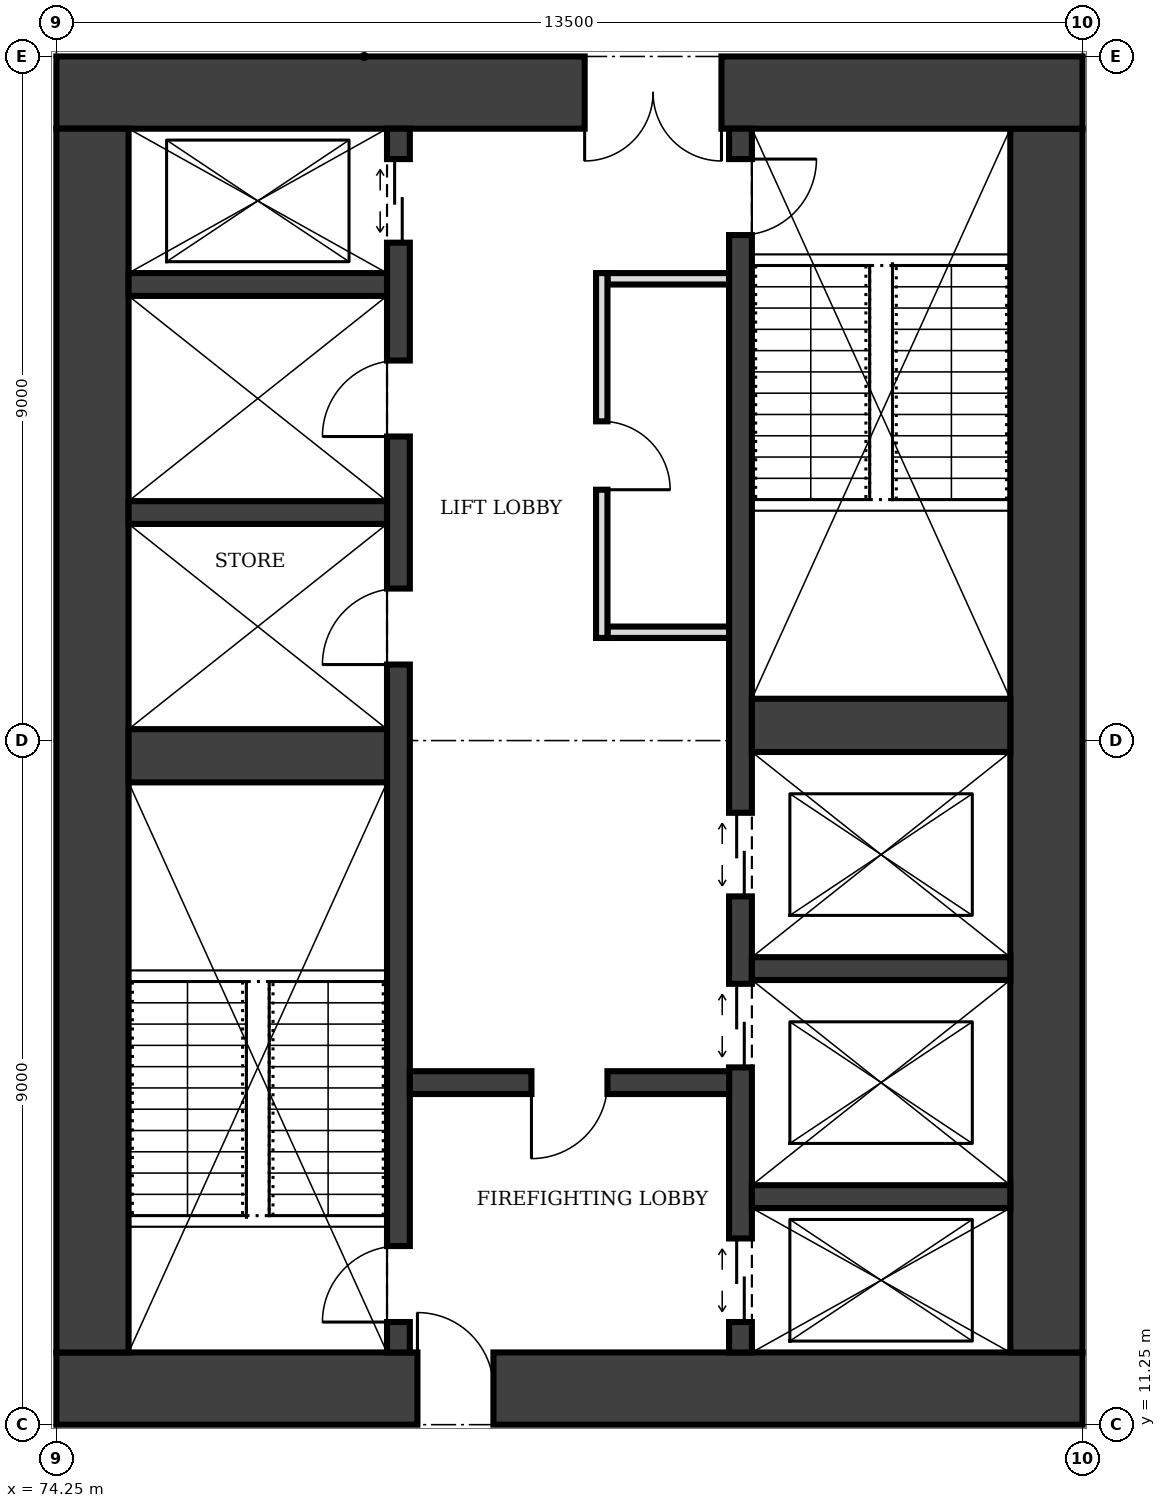
"""IFC4 building model, lengths in metres.
Left out: names, types, materials, properties, quantities, classifications, styles, units other than length and angle.
Written with IfcOpenShell. Run it as: python <this file> out.ifc"""

import sys

from ifc_helpers import new_model, si_unit, direction, frame, frame_2d, origin, place, context, subcontext, project, spatial, rectangle, extrude, element, fill, save


model = new_model("IFC4")
c1 = context("Model", 3, precision=1e-05, world=origin(), true_north=direction((0.0, 1.0)))
c2 = subcontext(c1, "Body", "Model", "MODEL_VIEW")
j1 = project(units=[si_unit("LENGTHUNIT", "METRE"), si_unit("PLANEANGLEUNIT", "RADIAN")], contexts=[c1])
p1 = place(None, origin())
s1 = spatial("IfcSite", under=j1, at=p1, CompositionType="ELEMENT")
p2 = place(p1, origin())
s2 = spatial("IfcBuilding", under=s1, at=p2, CompositionType="ELEMENT")
p3 = place(p2, frame((0.0, 0.0, 189.0)))
s3 = spatial("IfcBuildingStorey", under=s2, at=p3, CompositionType="ELEMENT", Elevation=189.0)
p4 = place(p3, frame((74.25, 11.725, 0.0), z_axis=(0.0, 0.0, 1.0), x_axis=(1.0, 0.0, 0.0)))
e1 = element("IfcWall", 1, at=p4, inside=s3, PredefinedType="SHEAR", context=c2, shape_type="SweptSolid", body=[
    extrude(rectangle(XDim=13.5, YDim=0.95, at=frame_2d((6.75, 0.0))), origin(), (0.0, 0.0, 1.0), 4.0),
])
p5 = place(p4, frame((4.75, 0.0, 0.0)))
e2 = element("IfcOpeningElement", 2, at=p5, cuts=e1, PredefinedType="OPENING", context=c2, shape_type="SweptSolid", body=[
    extrude(rectangle(XDim=1.0, YDim=2.1, at=frame_2d((0.5, 1.05))), frame((0.0, 0.485, 0.0), z_axis=(0.0, -1.0, 0.0), x_axis=(1.0, 0.0, 0.0)), (0.0, 0.0, 1.0), 0.97),
])
p6 = place(p3, frame((87.275, 12.2, 0.0), z_axis=(0.0, 0.0, 1.0), x_axis=(0.0, 1.0, 0.0)))
e3 = element("IfcWall", 3, at=p6, inside=s3, PredefinedType="SHEAR", context=c2, shape_type="SweptSolid", body=[
    extrude(rectangle(XDim=16.1, YDim=0.95, at=frame_2d((8.05, 0.0))), origin(), (0.0, 0.0, 1.0), 4.0),
])
p7 = place(p3, frame((87.75, 28.775, 0.0), z_axis=(0.0, 0.0, 1.0), x_axis=(-1.0, 0.0, 0.0)))
e4 = element("IfcWall", 4, at=p7, inside=s3, PredefinedType="SHEAR", context=c2, shape_type="SweptSolid", body=[
    extrude(rectangle(XDim=13.5, YDim=0.95, at=frame_2d((6.75, 0.0))), origin(), (0.0, 0.0, 1.0), 4.0),
])
p8 = place(p7, frame((4.75, 0.0, 0.0)))
e5 = element("IfcOpeningElement", 5, at=p8, cuts=e4, PredefinedType="OPENING", context=c2, shape_type="SweptSolid", body=[
    extrude(rectangle(XDim=1.8, YDim=2.1, at=frame_2d((0.9, 1.05))), frame((0.0, 0.485, 0.0), z_axis=(0.0, -1.0, 0.0), x_axis=(1.0, 0.0, 0.0)), (0.0, 0.0, 1.0), 0.97),
])
p9 = place(p3, frame((74.725, 28.3, 0.0), z_axis=(0.0, 0.0, 1.0), x_axis=(0.0, -1.0, 0.0)))
e6 = element("IfcWall", 6, at=p9, inside=s3, PredefinedType="SHEAR", context=c2, shape_type="SweptSolid", body=[
    extrude(rectangle(XDim=16.1, YDim=0.95, at=frame_2d((8.05, 0.0))), origin(), (0.0, 0.0, 1.0), 4.0),
])
p10 = place(p3, frame((78.75, 12.2, 0.0), z_axis=(0.0, 0.0, 1.0), x_axis=(0.0, 1.0, 0.0)))
e7 = element("IfcWall", 7, at=p10, inside=s3, PredefinedType="SHEAR", context=c2, shape_type="SweptSolid", body=[
    extrude(rectangle(XDim=16.1, YDim=0.3, at=frame_2d((8.05, 0.0))), origin(), (0.0, 0.0, 1.0), 4.0),
])
p11 = place(p10, frame((0.4, 0.0, 0.0)))
e8 = element("IfcOpeningElement", 8, at=p11, cuts=e7, PredefinedType="OPENING", context=c2, shape_type="SweptSolid", body=[
    extrude(rectangle(XDim=1.0, YDim=2.1, at=frame_2d((0.5, 1.05))), frame((0.0, 0.16, 0.0), z_axis=(0.0, -1.0, 0.0), x_axis=(1.0, 0.0, 0.0)), (0.0, 0.0, 1.0), 0.32),
])
p12 = place(p10, frame((14.6, 0.0, 0.0)))
e9 = element("IfcOpeningElement", 9, at=p12, cuts=e7, PredefinedType="OPENING", context=c2, shape_type="SweptSolid", body=[
    extrude(rectangle(XDim=1.1, YDim=2.1, at=frame_2d((0.55, 1.05))), frame((0.0, 0.16, 0.0), z_axis=(0.0, -1.0, 0.0), x_axis=(1.0, 0.0, 0.0)), (0.0, 0.0, 1.0), 0.32),
])
p13 = place(p10, frame((9.05, 0.0, 0.0)))
e10 = element("IfcOpeningElement", 10, at=p13, cuts=e7, PredefinedType="OPENING", context=c2, shape_type="SweptSolid", body=[
    extrude(rectangle(XDim=1.0, YDim=2.1, at=frame_2d((0.5, 1.05))), frame((0.0, 0.16, 0.0), z_axis=(0.0, -1.0, 0.0), x_axis=(1.0, 0.0, 0.0)), (0.0, 0.0, 1.0), 0.32),
])
p14 = place(p10, frame((12.05, 0.0, 0.0)))
e11 = element("IfcOpeningElement", 11, at=p14, cuts=e7, PredefinedType="OPENING", context=c2, shape_type="SweptSolid", body=[
    extrude(rectangle(XDim=1.0, YDim=2.1, at=frame_2d((0.5, 1.05))), frame((0.0, 0.16, 0.0), z_axis=(0.0, -1.0, 0.0), x_axis=(1.0, 0.0, 0.0)), (0.0, 0.0, 1.0), 0.32),
])
p15 = place(p3, frame((83.25, 12.2, 0.0), z_axis=(0.0, 0.0, 1.0), x_axis=(0.0, 1.0, 0.0)))
e12 = element("IfcWall", 12, at=p15, inside=s3, PredefinedType="SHEAR", context=c2, shape_type="SweptSolid", body=[
    extrude(rectangle(XDim=16.1, YDim=0.3, at=frame_2d((8.05, 0.0))), origin(), (0.0, 0.0, 1.0), 4.0),
])
p16 = place(p15, frame((14.7, 0.0, 0.0)))
e13 = element("IfcOpeningElement", 13, at=p16, cuts=e12, PredefinedType="OPENING", context=c2, shape_type="SweptSolid", body=[
    extrude(rectangle(XDim=1.0, YDim=2.1, at=frame_2d((0.5, 1.05))), frame((0.0, 0.16, 0.0), z_axis=(0.0, -1.0, 0.0), x_axis=(1.0, 0.0, 0.0)), (0.0, 0.0, 1.0), 0.32),
])
p17 = place(p15, frame((0.4, 0.0, 0.0)))
e14 = element("IfcOpeningElement", 14, at=p17, cuts=e12, PredefinedType="OPENING", context=c2, shape_type="SweptSolid", body=[
    extrude(rectangle(XDim=1.1, YDim=2.1, at=frame_2d((0.55, 1.05))), frame((0.0, 0.16, 0.0), z_axis=(0.0, -1.0, 0.0), x_axis=(1.0, 0.0, 0.0)), (0.0, 0.0, 1.0), 0.32),
])
p18 = place(p15, frame((3.75, 0.0, 0.0)))
e15 = element("IfcOpeningElement", 15, at=p18, cuts=e12, PredefinedType="OPENING", context=c2, shape_type="SweptSolid", body=[
    extrude(rectangle(XDim=1.1, YDim=2.1, at=frame_2d((0.55, 1.05))), frame((0.0, 0.16, 0.0), z_axis=(0.0, -1.0, 0.0), x_axis=(1.0, 0.0, 0.0)), (0.0, 0.0, 1.0), 0.32),
])
p19 = place(p15, frame((6.0, 0.0, 0.0)))
e16 = element("IfcOpeningElement", 16, at=p19, cuts=e12, PredefinedType="OPENING", context=c2, shape_type="SweptSolid", body=[
    extrude(rectangle(XDim=1.1, YDim=2.1, at=frame_2d((0.55, 1.05))), frame((0.0, 0.16, 0.0), z_axis=(0.0, -1.0, 0.0), x_axis=(1.0, 0.0, 0.0)), (0.0, 0.0, 1.0), 0.32),
])
p20 = place(p3, frame((75.2, 20.05, 0.0), z_axis=(0.0, 0.0, 1.0), x_axis=(1.0, 0.0, 0.0)))
e17 = element("IfcWall", 17, at=p20, inside=s3, PredefinedType="SHEAR", context=c2, shape_type="SweptSolid", body=[
    extrude(rectangle(XDim=3.4, YDim=0.7, at=frame_2d((1.7, 0.0))), origin(), (0.0, 0.0, 1.0), 4.0),
])
p21 = place(p3, frame((78.9, 15.75, 0.0), z_axis=(0.0, 0.0, 1.0), x_axis=(1.0, 0.0, 0.0)))
e18 = element("IfcWall", 18, at=p21, inside=s3, PredefinedType="SHEAR", context=c2, shape_type="SweptSolid", body=[
    extrude(rectangle(XDim=4.2, YDim=0.3, at=frame_2d((2.1, 0.0))), origin(), (0.0, 0.0, 1.0), 4.0),
])
p22 = place(p21, frame((1.6, 0.0, 0.0)))
e19 = element("IfcOpeningElement", 19, at=p22, cuts=e18, PredefinedType="OPENING", context=c2, shape_type="SweptSolid", body=[
    extrude(rectangle(XDim=1.0, YDim=2.1, at=frame_2d((0.5, 1.05))), frame((0.0, 0.16, 0.0), z_axis=(0.0, -1.0, 0.0), x_axis=(1.0, 0.0, 0.0)), (0.0, 0.0, 1.0), 0.32),
])
for number, where, z_axis, x_axis in (
    (20, (83.4, 14.25, 0.0), (0.0, 0.0, 1.0), (1.0, 0.0, 0.0)),
    (21, (83.4, 17.25, 0.0), (0.0, 0.0, 1.0), (1.0, 0.0, 0.0)),
):
    element("IfcWall", number, at=place(p3, frame(where, z_axis=z_axis, x_axis=x_axis)), inside=s3, PredefinedType="SHEAR", context=c2, shape_type="SweptSolid", body=[
        extrude(rectangle(XDim=3.4, YDim=0.3, at=frame_2d((1.7, 0.0))), origin(), (0.0, 0.0, 1.0), 4.0),
    ])
p23 = place(p3, frame((83.4, 20.45, 0.0), z_axis=(0.0, 0.0, 1.0), x_axis=(1.0, 0.0, 0.0)))
e22 = element("IfcWall", 22, at=p23, inside=s3, PredefinedType="SHEAR", context=c2, shape_type="SweptSolid", body=[
    extrude(rectangle(XDim=3.4, YDim=0.7, at=frame_2d((1.7, 0.0))), origin(), (0.0, 0.0, 1.0), 4.0),
])
for number, where, z_axis, x_axis in (
    (23, (75.2, 23.25, 0.0), (0.0, 0.0, 1.0), (1.0, 0.0, 0.0)),
    (24, (75.2, 26.25, 0.0), (0.0, 0.0, 1.0), (1.0, 0.0, 0.0)),
):
    element("IfcWall", number, at=place(p3, frame(where, z_axis=z_axis, x_axis=x_axis)), inside=s3, PredefinedType="SHEAR", context=c2, shape_type="SweptSolid", body=[
        extrude(rectangle(XDim=3.4, YDim=0.3, at=frame_2d((1.7, 0.0))), origin(), (0.0, 0.0, 1.0), 4.0),
    ])
p24 = place(p3, frame((81.425, 21.6, 0.0), z_axis=(0.0, 0.0, 1.0), x_axis=(0.0, 1.0, 0.0)))
e25 = element("IfcWall", 25, at=p24, inside=s3, PredefinedType="PARTITIONING", context=c2, shape_type="SweptSolid", body=[
    extrude(rectangle(XDim=4.8, YDim=0.15, at=frame_2d((2.4, 0.0))), origin(), (0.0, 0.0, 1.0), 3.75),
])
p25 = place(p24, frame((1.95, 0.0, 0.0)))
e26 = element("IfcOpeningElement", 26, at=p25, cuts=e25, PredefinedType="OPENING", context=c2, shape_type="SweptSolid", body=[
    extrude(rectangle(XDim=0.9, YDim=2.1, at=frame_2d((0.45, 1.05))), frame((0.0, 0.085, 0.0), z_axis=(0.0, -1.0, 0.0), x_axis=(1.0, 0.0, 0.0)), (0.0, 0.0, 1.0), 0.17),
])
for number, where, z_axis, x_axis in (
    (27, (81.5, 21.675, 0.0), (0.0, 0.0, 1.0), (1.0, 0.0, 0.0)),
    (28, (81.5, 26.325, 0.0), (0.0, 0.0, 1.0), (1.0, 0.0, 0.0)),
):
    element("IfcWall", number, at=place(p3, frame(where, z_axis=z_axis, x_axis=x_axis)), inside=s3, PredefinedType="PARTITIONING", context=c2, shape_type="SweptSolid", body=[
        extrude(rectangle(XDim=1.6, YDim=0.15, at=frame_2d((0.8, 0.0))), origin(), (0.0, 0.0, 1.0), 3.75),
    ])
p26 = place(p5, origin())
e29 = element("IfcDoor", 29, at=p26, inside=s3, OperationType="SINGLE_SWING_LEFT", PredefinedType="DOOR", context=c2, shape_type="SweptSolid", body=[
    extrude(rectangle(XDim=1.0, YDim=2.1, at=frame_2d((0.5, 1.05))), frame((0.0, 0.025, 0.0), z_axis=(0.0, -1.0, 0.0), x_axis=(1.0, 0.0, 0.0)), (0.0, 0.0, 1.0), 0.05),
])
fill(e2, e29)
p27 = place(p8, origin())
e30 = element("IfcDoor", 30, at=p27, inside=s3, OperationType="DOUBLE_DOOR_SINGLE_SWING", PredefinedType="DOOR", context=c2, shape_type="SweptSolid", body=[
    extrude(rectangle(XDim=1.8, YDim=2.1, at=frame_2d((0.9, 1.05))), frame((0.0, 0.025, 0.0), z_axis=(0.0, -1.0, 0.0), x_axis=(1.0, 0.0, 0.0)), (0.0, 0.0, 1.0), 0.05),
])
fill(e5, e30)
p28 = place(p22, frame((1.0, 0.0, 0.0), z_axis=(0.0, 0.0, 1.0), x_axis=(-1.0, 0.0, 0.0)))
e31 = element("IfcDoor", 31, at=p28, inside=s3, OperationType="SINGLE_SWING_RIGHT", PredefinedType="DOOR", context=c2, shape_type="SweptSolid", body=[
    extrude(rectangle(XDim=1.0, YDim=2.1, at=frame_2d((0.5, 1.05))), frame((0.0, 0.025, 0.0), z_axis=(0.0, -1.0, 0.0), x_axis=(1.0, 0.0, 0.0)), (0.0, 0.0, 1.0), 0.05),
])
fill(e19, e31)
p29 = place(p11, origin())
e32 = element("IfcDoor", 32, at=p29, inside=s3, OperationType="SINGLE_SWING_LEFT", PredefinedType="DOOR", context=c2, shape_type="SweptSolid", body=[
    extrude(rectangle(XDim=1.0, YDim=2.1, at=frame_2d((0.5, 1.05))), frame((0.0, 0.025, 0.0), z_axis=(0.0, -1.0, 0.0), x_axis=(1.0, 0.0, 0.0)), (0.0, 0.0, 1.0), 0.05),
])
fill(e8, e32)
p30 = place(p16, frame((1.0, 0.0, 0.0), z_axis=(0.0, 0.0, 1.0), x_axis=(-1.0, 0.0, 0.0)))
e33 = element("IfcDoor", 33, at=p30, inside=s3, OperationType="SINGLE_SWING_LEFT", PredefinedType="DOOR", context=c2, shape_type="SweptSolid", body=[
    extrude(rectangle(XDim=1.0, YDim=2.1, at=frame_2d((0.5, 1.05))), frame((0.0, 0.025, 0.0), z_axis=(0.0, -1.0, 0.0), x_axis=(1.0, 0.0, 0.0)), (0.0, 0.0, 1.0), 0.05),
])
fill(e13, e33)
p31 = place(p17, origin())
e34 = element("IfcDoor", 34, at=p31, inside=s3, OperationType="DOUBLE_DOOR_SLIDING", PredefinedType="DOOR", context=c2, shape_type="SweptSolid", body=[
    extrude(rectangle(XDim=1.1, YDim=2.1, at=frame_2d((0.55, 1.05))), frame((0.0, 0.025, 0.0), z_axis=(0.0, -1.0, 0.0), x_axis=(1.0, 0.0, 0.0)), (0.0, 0.0, 1.0), 0.05),
])
fill(e14, e34)
p32 = place(p12, origin())
e35 = element("IfcDoor", 35, at=p32, inside=s3, OperationType="DOUBLE_DOOR_SLIDING", PredefinedType="DOOR", context=c2, shape_type="SweptSolid", body=[
    extrude(rectangle(XDim=1.1, YDim=2.1, at=frame_2d((0.55, 1.05))), frame((0.0, 0.025, 0.0), z_axis=(0.0, -1.0, 0.0), x_axis=(1.0, 0.0, 0.0)), (0.0, 0.0, 1.0), 0.05),
])
fill(e9, e35)
p33 = place(p18, origin())
e36 = element("IfcDoor", 36, at=p33, inside=s3, OperationType="DOUBLE_DOOR_SLIDING", PredefinedType="DOOR", context=c2, shape_type="SweptSolid", body=[
    extrude(rectangle(XDim=1.1, YDim=2.1, at=frame_2d((0.55, 1.05))), frame((0.0, 0.025, 0.0), z_axis=(0.0, -1.0, 0.0), x_axis=(1.0, 0.0, 0.0)), (0.0, 0.0, 1.0), 0.05),
])
fill(e15, e36)
p34 = place(p19, origin())
e37 = element("IfcDoor", 37, at=p34, inside=s3, OperationType="DOUBLE_DOOR_SLIDING", PredefinedType="DOOR", context=c2, shape_type="SweptSolid", body=[
    extrude(rectangle(XDim=1.1, YDim=2.1, at=frame_2d((0.55, 1.05))), frame((0.0, 0.025, 0.0), z_axis=(0.0, -1.0, 0.0), x_axis=(1.0, 0.0, 0.0)), (0.0, 0.0, 1.0), 0.05),
])
fill(e16, e37)
p35 = place(p25, frame((0.9, 0.0, 0.0), z_axis=(0.0, 0.0, 1.0), x_axis=(-1.0, 0.0, 0.0)))
e38 = element("IfcDoor", 38, at=p35, inside=s3, OperationType="SINGLE_SWING_RIGHT", PredefinedType="DOOR", context=c2, shape_type="SweptSolid", body=[
    extrude(rectangle(XDim=0.9, YDim=2.1, at=frame_2d((0.45, 1.05))), frame((0.0, 0.025, 0.0), z_axis=(0.0, -1.0, 0.0), x_axis=(1.0, 0.0, 0.0)), (0.0, 0.0, 1.0), 0.05),
])
fill(e26, e38)
p36 = place(p13, origin())
e39 = element("IfcDoor", 39, at=p36, inside=s3, OperationType="SINGLE_SWING_LEFT", PredefinedType="DOOR", context=c2, shape_type="SweptSolid", body=[
    extrude(rectangle(XDim=1.0, YDim=2.1, at=frame_2d((0.5, 1.05))), frame((0.0, 0.025, 0.0), z_axis=(0.0, -1.0, 0.0), x_axis=(1.0, 0.0, 0.0)), (0.0, 0.0, 1.0), 0.05),
])
fill(e10, e39)
p37 = place(p14, origin())
e40 = element("IfcDoor", 40, at=p37, inside=s3, OperationType="SINGLE_SWING_LEFT", PredefinedType="DOOR", context=c2, shape_type="SweptSolid", body=[
    extrude(rectangle(XDim=1.0, YDim=2.1, at=frame_2d((0.5, 1.05))), frame((0.0, 0.025, 0.0), z_axis=(0.0, -1.0, 0.0), x_axis=(1.0, 0.0, 0.0)), (0.0, 0.0, 1.0), 0.05),
])
fill(e11, e40)
save(model, sys.argv[1])
